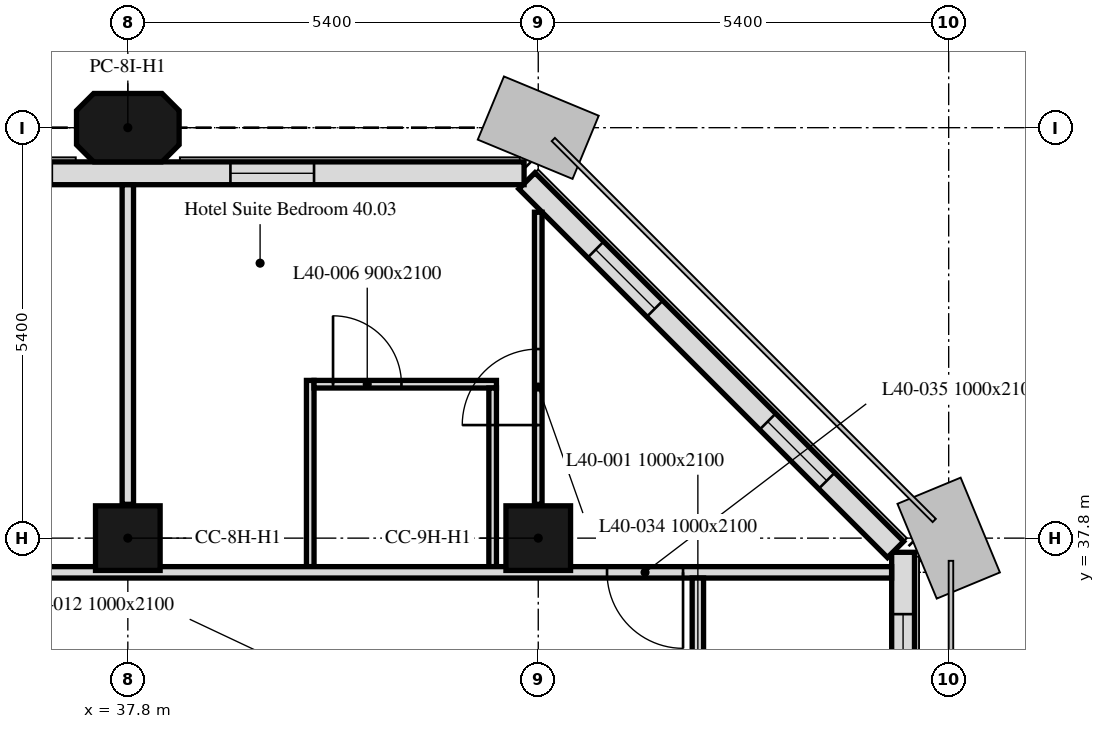
"""IFC4 building model, lengths in metres.
Left out: names, types, materials, properties, quantities, classifications, styles, units other than length and angle.
Written with IfcOpenShell. Run it as: python <this file> out.ifc"""

import sys

from ifc_helpers import new_model, si_unit, direction, frame, frame_2d, origin, origin_2d, place, context, subcontext, project, spatial, polyline, rectangle, outline, extrude, element, fill, save


model = new_model("IFC4")
c1 = context("Model", 3, precision=1e-05, world=origin(), true_north=direction((0.0, 1.0)))
c2 = subcontext(c1, "Body", "Model", "MODEL_VIEW")
j1 = project(units=[si_unit("LENGTHUNIT", "METRE"), si_unit("PLANEANGLEUNIT", "RADIAN")], contexts=[c1])
p1 = place(None, origin())
s1 = spatial("IfcSite", under=j1, at=p1, CompositionType="ELEMENT")
p2 = place(p1, origin())
s2 = spatial("IfcBuilding", under=s1, at=p2, CompositionType="ELEMENT")
p3 = place(p2, frame((0.0, 0.0, 169.3)))
s3 = spatial("IfcBuildingStorey", under=s2, at=p3, CompositionType="ELEMENT", Elevation=169.3)
for number, where, z_axis, x_axis in (
    (1, (37.8, 37.8, 0.0), (0.0, 0.0, 1.0), (1.0, 0.0, 0.0)),
    (2, (43.2, 37.8, 0.0), (0.0, 0.0, 1.0), (1.0, 0.0, 0.0)),
):
    element("IfcColumn", number, at=place(p3, frame(where, z_axis=z_axis, x_axis=x_axis)), inside=s3, PredefinedType="COLUMN", context=c2, shape_type="SweptSolid", body=[
        extrude(rectangle(XDim=0.85, YDim=0.85, at=origin_2d()), origin(), (0.0, 0.0, 1.0), 3.0),
    ])
p4 = place(p3, frame((37.8, 43.2, 0.0), z_axis=(0.0, 0.0, 1.0), x_axis=(1.0, 0.0, 0.0)))
e3 = element("IfcColumn", 3, at=p4, inside=s3, PredefinedType="COLUMN", context=c2, shape_type="SweptSolid", body=[
    extrude(outline(polyline([(-0.45, -0.45), (0.45, -0.45), (0.675, -0.225), (0.675, 0.225), (0.45, 0.45), (-0.45, 0.45), (-0.675, 0.225), (-0.675, -0.225), (-0.45, -0.45)])), origin(), (0.0, 0.0, 1.0), 3.0),
])
p5 = place(p3, frame((48.0, 5.586, 0.0), z_axis=(0.0, 0.0, 1.0), x_axis=(0.0, 1.0, 0.0)))
e4 = element("IfcWall", 4, at=p5, inside=s3, PredefinedType="SOLIDWALL", context=c2, shape_type="SweptSolid", body=[
    extrude(rectangle(XDim=32.027, YDim=0.3, at=frame_2d((16.014, 0.0))), origin(), (0.0, 0.0, 1.0), 3.0),
])
p6 = place(p5, frame((1.164, 0.0, 0.9)))
e5 = element("IfcOpeningElement", 5, at=p6, cuts=e4, PredefinedType="OPENING", context=c2, shape_type="SweptSolid", body=[
    extrude(rectangle(XDim=1.1, YDim=1.7, at=frame_2d((0.55, 0.85))), frame((0.0, 0.16, 0.0), z_axis=(0.0, -1.0, 0.0), x_axis=(1.0, 0.0, 0.0)), (0.0, 0.0, 1.0), 0.32),
])
p7 = place(p5, frame((2.764, 0.0, 0.9)))
e6 = element("IfcOpeningElement", 6, at=p7, cuts=e4, PredefinedType="OPENING", context=c2, shape_type="SweptSolid", body=[
    extrude(rectangle(XDim=1.1, YDim=1.7, at=frame_2d((0.55, 0.85))), frame((0.0, 0.16, 0.0), z_axis=(0.0, -1.0, 0.0), x_axis=(1.0, 0.0, 0.0)), (0.0, 0.0, 1.0), 0.32),
])
p8 = place(p5, frame((6.214, 0.0, 0.9)))
e7 = element("IfcOpeningElement", 7, at=p8, cuts=e4, PredefinedType="OPENING", context=c2, shape_type="SweptSolid", body=[
    extrude(rectangle(XDim=3.4, YDim=1.7, at=frame_2d((1.7, 0.85))), frame((0.0, 0.16, 0.0), z_axis=(0.0, -1.0, 0.0), x_axis=(1.0, 0.0, 0.0)), (0.0, 0.0, 1.0), 0.32),
])
p9 = place(p5, frame((11.964, 0.0, 0.9)))
e8 = element("IfcOpeningElement", 8, at=p9, cuts=e4, PredefinedType="OPENING", context=c2, shape_type="SweptSolid", body=[
    extrude(rectangle(XDim=1.1, YDim=1.7, at=frame_2d((0.55, 0.85))), frame((0.0, 0.16, 0.0), z_axis=(0.0, -1.0, 0.0), x_axis=(1.0, 0.0, 0.0)), (0.0, 0.0, 1.0), 0.32),
])
p10 = place(p5, frame((13.564, 0.0, 0.9)))
e9 = element("IfcOpeningElement", 9, at=p10, cuts=e4, PredefinedType="OPENING", context=c2, shape_type="SweptSolid", body=[
    extrude(rectangle(XDim=1.1, YDim=1.7, at=frame_2d((0.55, 0.85))), frame((0.0, 0.16, 0.0), z_axis=(0.0, -1.0, 0.0), x_axis=(1.0, 0.0, 0.0)), (0.0, 0.0, 1.0), 0.32),
])
p11 = place(p5, frame((17.364, 0.0, 0.9)))
e10 = element("IfcOpeningElement", 10, at=p11, cuts=e4, PredefinedType="OPENING", context=c2, shape_type="SweptSolid", body=[
    extrude(rectangle(XDim=1.1, YDim=1.7, at=frame_2d((0.55, 0.85))), frame((0.0, 0.16, 0.0), z_axis=(0.0, -1.0, 0.0), x_axis=(1.0, 0.0, 0.0)), (0.0, 0.0, 1.0), 0.32),
])
p12 = place(p5, frame((18.964, 0.0, 0.9)))
e11 = element("IfcOpeningElement", 11, at=p12, cuts=e4, PredefinedType="OPENING", context=c2, shape_type="SweptSolid", body=[
    extrude(rectangle(XDim=1.1, YDim=1.7, at=frame_2d((0.55, 0.85))), frame((0.0, 0.16, 0.0), z_axis=(0.0, -1.0, 0.0), x_axis=(1.0, 0.0, 0.0)), (0.0, 0.0, 1.0), 0.32),
])
p13 = place(p5, frame((22.764, 0.0, 0.9)))
e12 = element("IfcOpeningElement", 12, at=p13, cuts=e4, PredefinedType="OPENING", context=c2, shape_type="SweptSolid", body=[
    extrude(rectangle(XDim=1.1, YDim=1.7, at=frame_2d((0.55, 0.85))), frame((0.0, 0.16, 0.0), z_axis=(0.0, -1.0, 0.0), x_axis=(1.0, 0.0, 0.0)), (0.0, 0.0, 1.0), 0.32),
])
p14 = place(p5, frame((24.364, 0.0, 0.9)))
e13 = element("IfcOpeningElement", 13, at=p14, cuts=e4, PredefinedType="OPENING", context=c2, shape_type="SweptSolid", body=[
    extrude(rectangle(XDim=1.1, YDim=1.7, at=frame_2d((0.55, 0.85))), frame((0.0, 0.16, 0.0), z_axis=(0.0, -1.0, 0.0), x_axis=(1.0, 0.0, 0.0)), (0.0, 0.0, 1.0), 0.32),
])
p15 = place(p5, frame((27.814, 0.0, 0.9)))
e14 = element("IfcOpeningElement", 14, at=p15, cuts=e4, PredefinedType="OPENING", context=c2, shape_type="SweptSolid", body=[
    extrude(rectangle(XDim=3.4, YDim=1.7, at=frame_2d((1.7, 0.85))), frame((0.0, 0.16, 0.0), z_axis=(0.0, -1.0, 0.0), x_axis=(1.0, 0.0, 0.0)), (0.0, 0.0, 1.0), 0.32),
])
p16 = place(p3, frame((47.901, 37.65, 0.0), z_axis=(0.0, 0.0, 1.0), x_axis=(-0.707106781187, 0.707106781187, 0.0)))
e15 = element("IfcWall", 15, at=p16, inside=s3, PredefinedType="SOLIDWALL", context=c2, shape_type="SweptSolid", body=[
    extrude(rectangle(XDim=6.86, YDim=0.3, at=frame_2d((3.43, 0.0))), origin(), (0.0, 0.0, 1.0), 3.0),
])
p17 = place(p16, frame((1.28, 0.0, 0.9)))
e16 = element("IfcOpeningElement", 16, at=p17, cuts=e15, PredefinedType="OPENING", context=c2, shape_type="SweptSolid", body=[
    extrude(rectangle(XDim=1.1, YDim=1.7, at=frame_2d((0.55, 0.85))), frame((0.0, 0.16, 0.0), z_axis=(0.0, -1.0, 0.0), x_axis=(1.0, 0.0, 0.0)), (0.0, 0.0, 1.0), 0.32),
])
p18 = place(p16, frame((4.48, 0.0, 0.9)))
e17 = element("IfcOpeningElement", 17, at=p18, cuts=e15, PredefinedType="OPENING", context=c2, shape_type="SweptSolid", body=[
    extrude(rectangle(XDim=1.1, YDim=1.7, at=frame_2d((0.55, 0.85))), frame((0.0, 0.16, 0.0), z_axis=(0.0, -1.0, 0.0), x_axis=(1.0, 0.0, 0.0)), (0.0, 0.0, 1.0), 0.32),
])
p19 = place(p3, frame((43.014, 42.6, 0.0), z_axis=(0.0, 0.0, 1.0), x_axis=(-1.0, 0.0, 0.0)))
e18 = element("IfcWall", 18, at=p19, inside=s3, PredefinedType="SOLIDWALL", context=c2, shape_type="SweptSolid", body=[
    extrude(rectangle(XDim=32.027, YDim=0.3, at=frame_2d((16.014, 0.0))), origin(), (0.0, 0.0, 1.0), 3.0),
])
p20 = place(p19, frame((2.764, 0.0, 0.9)))
e19 = element("IfcOpeningElement", 19, at=p20, cuts=e18, PredefinedType="OPENING", context=c2, shape_type="SweptSolid", body=[
    extrude(rectangle(XDim=1.1, YDim=1.7, at=frame_2d((0.55, 0.85))), frame((0.0, 0.16, 0.0), z_axis=(0.0, -1.0, 0.0), x_axis=(1.0, 0.0, 0.0)), (0.0, 0.0, 1.0), 0.32),
])
p21 = place(p19, frame((6.214, 0.0, 0.9)))
e20 = element("IfcOpeningElement", 20, at=p21, cuts=e18, PredefinedType="OPENING", context=c2, shape_type="SweptSolid", body=[
    extrude(rectangle(XDim=3.4, YDim=1.7, at=frame_2d((1.7, 0.85))), frame((0.0, 0.16, 0.0), z_axis=(0.0, -1.0, 0.0), x_axis=(1.0, 0.0, 0.0)), (0.0, 0.0, 1.0), 0.32),
])
p22 = place(p19, frame((13.564, 0.0, 0.9)))
e21 = element("IfcOpeningElement", 21, at=p22, cuts=e18, PredefinedType="OPENING", context=c2, shape_type="SweptSolid", body=[
    extrude(rectangle(XDim=1.1, YDim=1.7, at=frame_2d((0.55, 0.85))), frame((0.0, 0.16, 0.0), z_axis=(0.0, -1.0, 0.0), x_axis=(1.0, 0.0, 0.0)), (0.0, 0.0, 1.0), 0.32),
])
p23 = place(p19, frame((17.014, 0.0, 0.9)))
e22 = element("IfcOpeningElement", 22, at=p23, cuts=e18, PredefinedType="OPENING", context=c2, shape_type="SweptSolid", body=[
    extrude(rectangle(XDim=3.4, YDim=1.7, at=frame_2d((1.7, 0.85))), frame((0.0, 0.16, 0.0), z_axis=(0.0, -1.0, 0.0), x_axis=(1.0, 0.0, 0.0)), (0.0, 0.0, 1.0), 0.32),
])
p24 = place(p19, frame((24.364, 0.0, 0.9)))
e23 = element("IfcOpeningElement", 23, at=p24, cuts=e18, PredefinedType="OPENING", context=c2, shape_type="SweptSolid", body=[
    extrude(rectangle(XDim=1.1, YDim=1.7, at=frame_2d((0.55, 0.85))), frame((0.0, 0.16, 0.0), z_axis=(0.0, -1.0, 0.0), x_axis=(1.0, 0.0, 0.0)), (0.0, 0.0, 1.0), 0.32),
])
p25 = place(p19, frame((27.814, 0.0, 0.9)))
e24 = element("IfcOpeningElement", 24, at=p25, cuts=e18, PredefinedType="OPENING", context=c2, shape_type="SweptSolid", body=[
    extrude(rectangle(XDim=3.4, YDim=1.7, at=frame_2d((1.7, 0.85))), frame((0.0, 0.16, 0.0), z_axis=(0.0, -1.0, 0.0), x_axis=(1.0, 0.0, 0.0)), (0.0, 0.0, 1.0), 0.32),
])
p26 = place(p3, frame((37.8, 38.245, 0.0), z_axis=(0.0, 0.0, 1.0), x_axis=(0.0, 1.0, 0.0)))
e25 = element("IfcWall", 25, at=p26, inside=s3, PredefinedType="PARTITIONING", context=c2, shape_type="SweptSolid", body=[
    extrude(rectangle(XDim=4.204, YDim=0.15, at=frame_2d((2.102, 0.0))), origin(), (0.0, 0.0, 1.0), 3.0),
])
p27 = place(p3, frame((40.2, 37.425, 0.0), z_axis=(0.0, 0.0, 1.0), x_axis=(0.0, 1.0, 0.0)))
e26 = element("IfcWall", 26, at=p27, inside=s3, PredefinedType="PARTITIONING", context=c2, shape_type="SweptSolid", body=[
    extrude(rectangle(XDim=2.45, YDim=0.1, at=frame_2d((1.225, 0.0))), origin(), (0.0, 0.0, 1.0), 3.0),
])
p28 = place(p3, frame((40.25, 39.825, 0.0), z_axis=(0.0, 0.0, 1.0), x_axis=(1.0, 0.0, 0.0)))
e27 = element("IfcWall", 27, at=p28, inside=s3, PredefinedType="PARTITIONING", context=c2, shape_type="SweptSolid", body=[
    extrude(rectangle(XDim=2.4, YDim=0.1, at=frame_2d((1.2, 0.0))), origin(), (0.0, 0.0, 1.0), 3.0),
])
p29 = place(p28, frame((0.25, 0.0, 0.0)))
e28 = element("IfcOpeningElement", 28, at=p29, cuts=e27, PredefinedType="OPENING", context=c2, shape_type="SweptSolid", body=[
    extrude(rectangle(XDim=0.9, YDim=2.1, at=frame_2d((0.45, 1.05))), frame((0.0, 0.05, 0.0), z_axis=(0.0, -1.0, 0.0), x_axis=(1.0, 0.0, 0.0)), (0.0, 0.0, 1.0), 0.1),
])
p30 = place(p3, frame((42.6, 39.775, 0.0), z_axis=(0.0, 0.0, 1.0), x_axis=(0.0, -1.0, 0.0)))
e29 = element("IfcWall", 29, at=p30, inside=s3, PredefinedType="PARTITIONING", context=c2, shape_type="SweptSolid", body=[
    extrude(rectangle(XDim=2.35, YDim=0.1, at=frame_2d((1.175, 0.0))), origin(), (0.0, 0.0, 1.0), 3.0),
])
p31 = place(p3, frame((43.2, 38.245, 0.0), z_axis=(0.0, 0.0, 1.0), x_axis=(0.0, 1.0, 0.0)))
e30 = element("IfcWall", 30, at=p31, inside=s3, PredefinedType="PARTITIONING", context=c2, shape_type="SweptSolid", body=[
    extrude(rectangle(XDim=3.843, YDim=0.1, at=frame_2d((1.921, 0.0))), origin(), (0.0, 0.0, 1.0), 3.0),
])
p32 = place(p31, frame((1.042, 0.0, 0.0)))
e31 = element("IfcOpeningElement", 31, at=p32, cuts=e30, PredefinedType="OPENING", context=c2, shape_type="SweptSolid", body=[
    extrude(rectangle(XDim=1.0, YDim=2.1, at=frame_2d((0.5, 1.05))), frame((0.0, 0.05, 0.0), z_axis=(0.0, -1.0, 0.0), x_axis=(1.0, 0.0, 0.0)), (0.0, 0.0, 1.0), 0.1),
])
p33 = place(p3, frame((47.849, 37.35, 0.0), z_axis=(0.0, 0.0, 1.0), x_axis=(-1.0, 0.0, 0.0)))
e32 = element("IfcWall", 32, at=p33, inside=s3, PredefinedType="PARTITIONING", context=c2, shape_type="SweptSolid", body=[
    extrude(rectangle(XDim=41.698, YDim=0.15, at=frame_2d((20.849, 0.0))), origin(), (0.0, 0.0, 1.0), 3.0),
])
p34 = place(p33, frame((39.249, 0.0, 0.0)))
e33 = element("IfcOpeningElement", 33, at=p34, cuts=e32, PredefinedType="OPENING", context=c2, shape_type="SweptSolid", body=[
    extrude(rectangle(XDim=1.0, YDim=2.1, at=frame_2d((0.5, 1.05))), frame((0.0, 0.075, 0.0), z_axis=(0.0, -1.0, 0.0), x_axis=(1.0, 0.0, 0.0)), (0.0, 0.0, 1.0), 0.15),
])
p35 = place(p33, frame((27.649, 0.0, 0.0)))
e34 = element("IfcOpeningElement", 34, at=p35, cuts=e32, PredefinedType="OPENING", context=c2, shape_type="SweptSolid", body=[
    extrude(rectangle(XDim=1.0, YDim=2.1, at=frame_2d((0.5, 1.05))), frame((0.0, 0.075, 0.0), z_axis=(0.0, -1.0, 0.0), x_axis=(1.0, 0.0, 0.0)), (0.0, 0.0, 1.0), 0.15),
])
p36 = place(p33, frame((22.249, 0.0, 0.0)))
e35 = element("IfcOpeningElement", 35, at=p36, cuts=e32, PredefinedType="OPENING", context=c2, shape_type="SweptSolid", body=[
    extrude(rectangle(XDim=1.0, YDim=2.1, at=frame_2d((0.5, 1.05))), frame((0.0, 0.075, 0.0), z_axis=(0.0, -1.0, 0.0), x_axis=(1.0, 0.0, 0.0)), (0.0, 0.0, 1.0), 0.15),
])
p37 = place(p33, frame((17.649, 0.0, 0.0)))
e36 = element("IfcOpeningElement", 36, at=p37, cuts=e32, PredefinedType="OPENING", context=c2, shape_type="SweptSolid", body=[
    extrude(rectangle(XDim=1.0, YDim=2.1, at=frame_2d((0.5, 1.05))), frame((0.0, 0.075, 0.0), z_axis=(0.0, -1.0, 0.0), x_axis=(1.0, 0.0, 0.0)), (0.0, 0.0, 1.0), 0.15),
])
p38 = place(p33, frame((2.744, 0.0, 0.0)))
e37 = element("IfcOpeningElement", 37, at=p38, cuts=e32, PredefinedType="OPENING", context=c2, shape_type="SweptSolid", body=[
    extrude(rectangle(XDim=1.0, YDim=2.1, at=frame_2d((0.5, 1.05))), frame((0.0, 0.075, 0.0), z_axis=(0.0, -1.0, 0.0), x_axis=(1.0, 0.0, 0.0)), (0.0, 0.0, 1.0), 0.15),
])
p39 = place(p3, frame((45.3, 37.275, 0.0), z_axis=(0.0, 0.0, 1.0), x_axis=(0.0, -1.0, 0.0)))
e38 = element("IfcWall", 38, at=p39, inside=s3, PredefinedType="PARTITIONING", context=c2, shape_type="SweptSolid", body=[
    extrude(rectangle(XDim=15.6, YDim=0.15, at=frame_2d((7.8, 0.0))), origin(), (0.0, 0.0, 1.0), 2.4),
])
p40 = place(p39, frame((1.9, 0.0, 0.0)))
e39 = element("IfcOpeningElement", 39, at=p40, cuts=e38, PredefinedType="OPENING", context=c2, shape_type="SweptSolid", body=[
    extrude(rectangle(XDim=1.0, YDim=2.1, at=frame_2d((0.5, 1.05))), frame((0.0, 0.075, 0.0), z_axis=(0.0, -1.0, 0.0), x_axis=(1.0, 0.0, 0.0)), (0.0, 0.0, 1.0), 0.15),
])
p41 = place(p39, frame((8.425, 0.0, 0.0)))
e40 = element("IfcOpeningElement", 40, at=p41, cuts=e38, PredefinedType="OPENING", context=c2, shape_type="SweptSolid", body=[
    extrude(rectangle(XDim=1.0, YDim=2.1, at=frame_2d((0.5, 1.05))), frame((0.0, 0.075, 0.0), z_axis=(0.0, -1.0, 0.0), x_axis=(1.0, 0.0, 0.0)), (0.0, 0.0, 1.0), 0.15),
])
p42 = place(p15, origin())
e41 = element("IfcWindow", 41, at=p42, inside=s3, PartitioningType="SINGLE_PANEL", PredefinedType="WINDOW", context=c2, shape_type="SweptSolid", body=[
    extrude(rectangle(XDim=3.4, YDim=1.7, at=frame_2d((1.7, 0.85))), frame((0.0, 0.03, 0.0), z_axis=(0.0, -1.0, 0.0), x_axis=(1.0, 0.0, 0.0)), (0.0, 0.0, 1.0), 0.06),
])
fill(e14, e41)
p43 = place(p17, origin())
e42 = element("IfcWindow", 42, at=p43, inside=s3, PartitioningType="SINGLE_PANEL", PredefinedType="WINDOW", context=c2, shape_type="SweptSolid", body=[
    extrude(rectangle(XDim=1.1, YDim=1.7, at=frame_2d((0.55, 0.85))), frame((0.0, 0.03, 0.0), z_axis=(0.0, -1.0, 0.0), x_axis=(1.0, 0.0, 0.0)), (0.0, 0.0, 1.0), 0.06),
])
fill(e16, e42)
p44 = place(p18, origin())
e43 = element("IfcWindow", 43, at=p44, inside=s3, PartitioningType="SINGLE_PANEL", PredefinedType="WINDOW", context=c2, shape_type="SweptSolid", body=[
    extrude(rectangle(XDim=1.1, YDim=1.7, at=frame_2d((0.55, 0.85))), frame((0.0, 0.03, 0.0), z_axis=(0.0, -1.0, 0.0), x_axis=(1.0, 0.0, 0.0)), (0.0, 0.0, 1.0), 0.06),
])
fill(e17, e43)
p45 = place(p20, origin())
e44 = element("IfcWindow", 44, at=p45, inside=s3, PartitioningType="SINGLE_PANEL", PredefinedType="WINDOW", context=c2, shape_type="SweptSolid", body=[
    extrude(rectangle(XDim=1.1, YDim=1.7, at=frame_2d((0.55, 0.85))), frame((0.0, 0.03, 0.0), z_axis=(0.0, -1.0, 0.0), x_axis=(1.0, 0.0, 0.0)), (0.0, 0.0, 1.0), 0.06),
])
fill(e19, e44)
p46 = place(p29, origin())
e45 = element("IfcDoor", 45, at=p46, inside=s3, OperationType="SINGLE_SWING_RIGHT", PredefinedType="DOOR", context=c2, shape_type="SweptSolid", body=[
    extrude(rectangle(XDim=0.9, YDim=2.1, at=frame_2d((0.45, 1.05))), frame((0.0, 0.025, 0.0), z_axis=(0.0, -1.0, 0.0), x_axis=(1.0, 0.0, 0.0)), (0.0, 0.0, 1.0), 0.05),
])
fill(e28, e45)
p47 = place(p32, origin())
e46 = element("IfcDoor", 46, at=p47, inside=s3, OperationType="SINGLE_SWING_RIGHT", PredefinedType="DOOR", context=c2, shape_type="SweptSolid", body=[
    extrude(rectangle(XDim=1.0, YDim=2.1, at=frame_2d((0.5, 1.05))), frame((0.0, 0.025, 0.0), z_axis=(0.0, -1.0, 0.0), x_axis=(1.0, 0.0, 0.0)), (0.0, 0.0, 1.0), 0.05),
])
fill(e31, e46)
p48 = place(p38, origin())
e47 = element("IfcDoor", 47, at=p48, inside=s3, OperationType="SINGLE_SWING_LEFT", PredefinedType="DOOR", context=c2, shape_type="SweptSolid", body=[
    extrude(rectangle(XDim=1.0, YDim=2.1, at=frame_2d((0.5, 1.05))), frame((0.0, 0.025, 0.0), z_axis=(0.0, -1.0, 0.0), x_axis=(1.0, 0.0, 0.0)), (0.0, 0.0, 1.0), 0.05),
])
fill(e37, e47)
save(model, sys.argv[1])
